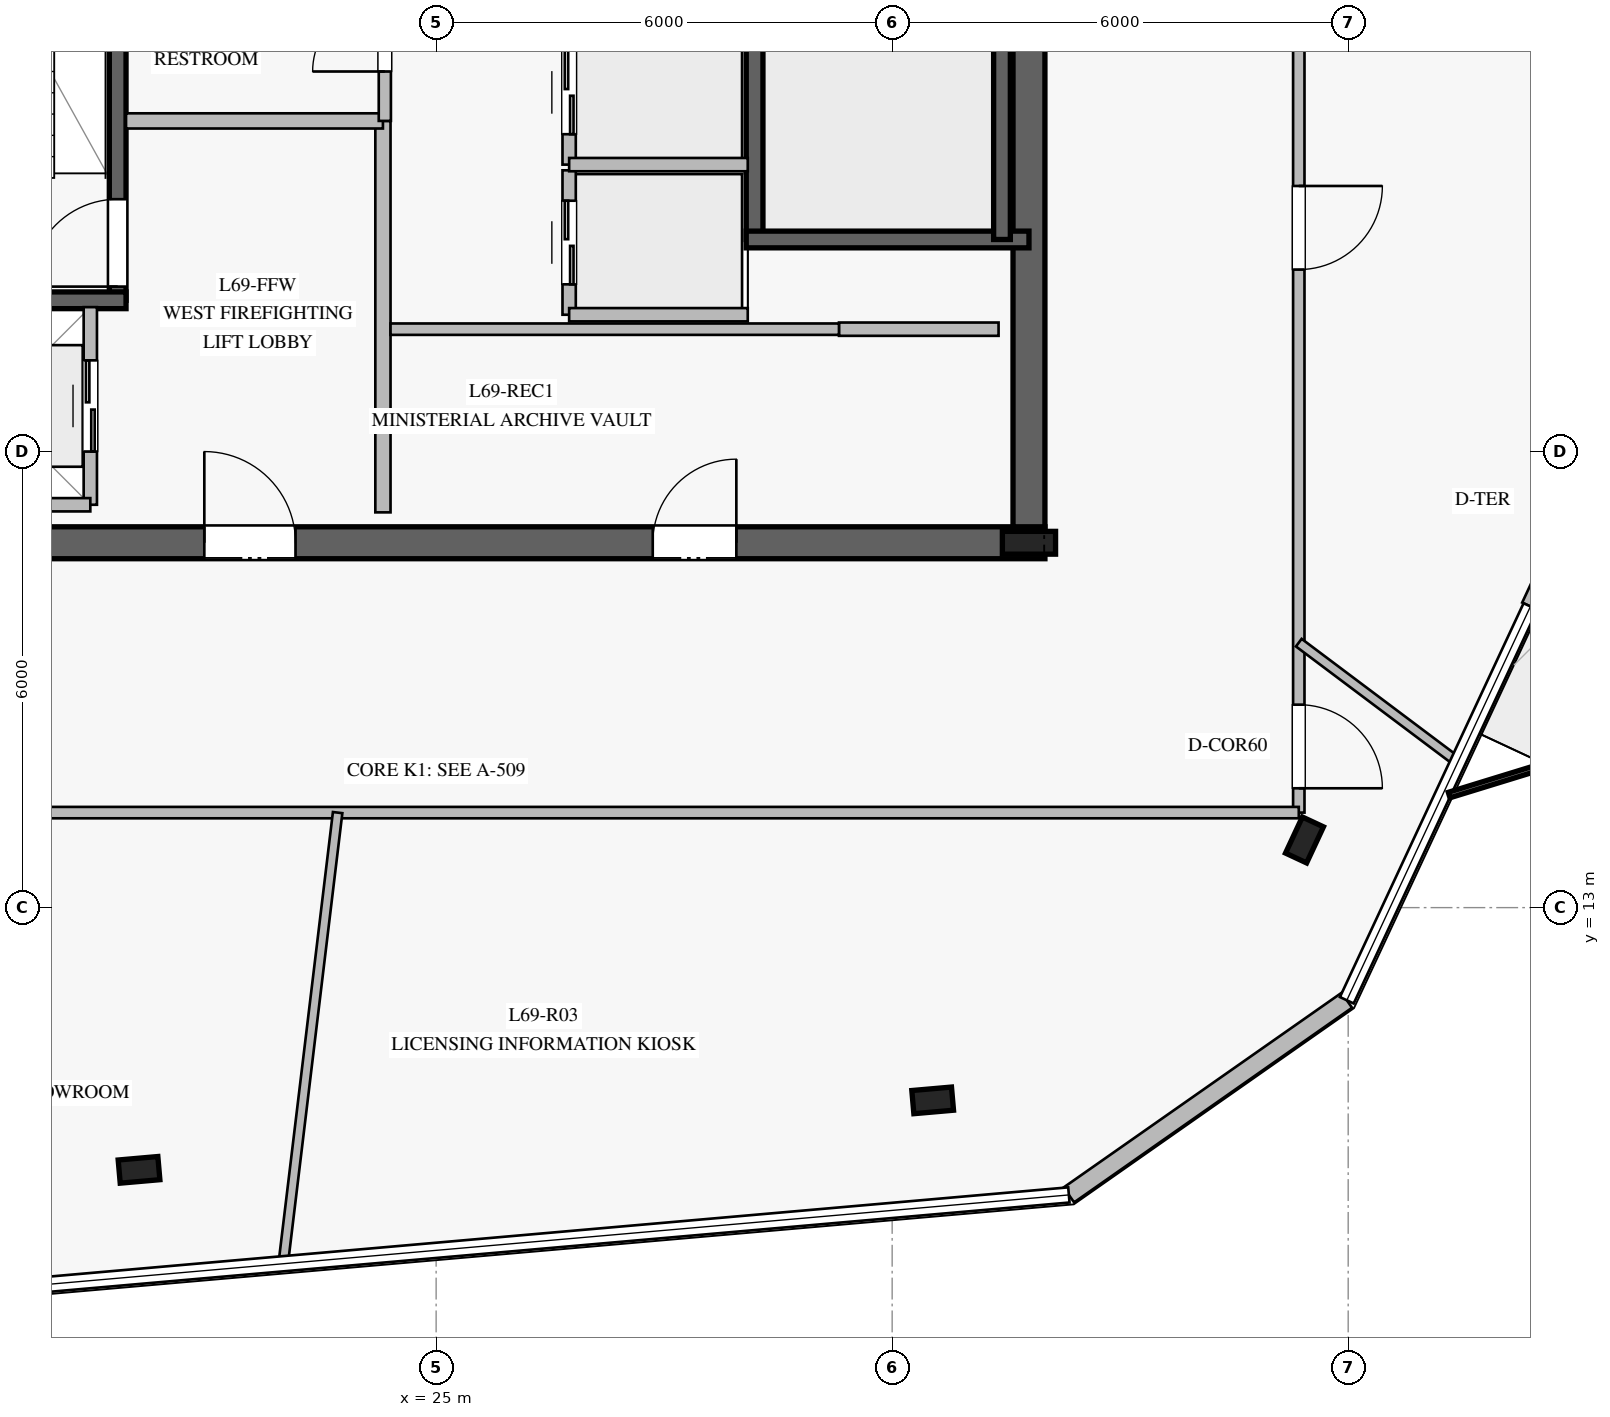
"""IFC4 building model, lengths in metres.
Left out: names, types, materials, properties, quantities, classifications, styles, units other than length and angle.
Written with IfcOpenShell. Run it as: python <this file> out.ifc"""

import sys

from ifc_helpers import new_model, si_unit, direction, frame, frame_2d, origin, origin_2d, place, context, subcontext, project, spatial, rectangle, i_section, extrude, element, fill, save


model = new_model("IFC4")
c1 = context("Model", 3, precision=1e-05, world=origin(), true_north=direction((0.0, 1.0)))
c2 = subcontext(c1, "Body", "Model", "MODEL_VIEW")
j1 = project(units=[si_unit("LENGTHUNIT", "METRE"), si_unit("PLANEANGLEUNIT", "RADIAN")], contexts=[c1])
p1 = place(None, origin())
s1 = spatial("IfcSite", under=j1, at=p1, CompositionType="ELEMENT")
p2 = place(p1, origin())
s2 = spatial("IfcBuilding", under=s1, at=p2, CompositionType="ELEMENT")
p3 = place(p2, frame((0.0, 0.0, 286.2)))
s3 = spatial("IfcBuildingStorey", under=s2, at=p3, CompositionType="ELEMENT", Elevation=286.2)
p4 = place(p3, frame((16.99, 17.8, 0.0), z_axis=(0.0, 0.0, 1.0), x_axis=(1.0, 0.0, 0.0)))
e1 = element("IfcWall", 1, at=p4, inside=s3, PredefinedType="SHEAR", context=c2, shape_type="SweptSolid", body=[
    extrude(rectangle(XDim=16.02, YDim=0.42, at=frame_2d((8.01, 0.0))), origin(), (0.0, 0.0, 1.0), 3.78),
])
p5 = place(p4, frame((4.96, 0.0, 0.0)))
e2 = element("IfcOpeningElement", 2, at=p5, cuts=e1, PredefinedType="OPENING", context=c2, shape_type="SweptSolid", body=[
    extrude(rectangle(XDim=1.2, YDim=2.25, at=frame_2d((0.6, 1.125))), frame((0.0, 0.22, 0.0), z_axis=(0.0, -1.0, 0.0), x_axis=(1.0, 0.0, 0.0)), (0.0, 0.0, 1.0), 0.44),
])
p6 = place(p4, frame((10.86, 0.0, 0.0)))
e3 = element("IfcOpeningElement", 3, at=p6, cuts=e1, PredefinedType="OPENING", context=c2, shape_type="SweptSolid", body=[
    extrude(rectangle(XDim=1.1, YDim=2.2, at=frame_2d((0.55, 1.1))), frame((0.0, 0.22, 0.0), z_axis=(0.0, -1.0, 0.0), x_axis=(1.0, 0.0, 0.0)), (0.0, 0.0, 1.0), 0.44),
])
p7 = place(p3, frame((32.8, 18.01, 0.0), z_axis=(0.0, 0.0, 1.0), x_axis=(0.0, 1.0, 0.0)))
e4 = element("IfcWall", 4, at=p7, inside=s3, PredefinedType="SHEAR", context=c2, shape_type="SweptSolid", body=[
    extrude(rectangle(XDim=13.98, YDim=0.42, at=frame_2d((6.99, 0.0))), origin(), (0.0, 0.0, 1.0), 3.78),
])
p8 = place(p3, frame((32.8, 17.8, 0.0), z_axis=(0.0, 0.0, 1.0), x_axis=(1.0, 0.0, 0.0)))
e5 = element("IfcColumn", 5, at=p8, inside=s3, PredefinedType="COLUMN", context=c2, shape_type="SweptSolid", body=[
    extrude(i_section(OverallWidth=0.3, OverallDepth=0.7, WebThickness=0.017, FlangeThickness=0.032, at=origin_2d()), origin(), (0.0, 0.0, 1.0), 4.0),
])
p9 = place(p3, frame((20.81, 20.99, 0.0), z_axis=(0.0, 0.0, 1.0), x_axis=(0.0, 1.0, 0.0)))
e6 = element("IfcWall", 6, at=p9, inside=s3, PredefinedType="SOLIDWALL", context=c2, shape_type="SweptSolid", body=[
    extrude(rectangle(XDim=7.22, YDim=0.22, at=frame_2d((3.61, 0.0))), origin(), (0.0, 0.0, 1.0), 3.78),
])
p10 = place(p9, frame((0.18, 0.0, 0.0)))
e7 = element("IfcOpeningElement", 7, at=p10, cuts=e6, PredefinedType="OPENING", context=c2, shape_type="SweptSolid", body=[
    extrude(rectangle(XDim=1.15, YDim=2.2, at=frame_2d((0.575, 1.1))), frame((0.0, 0.12, 0.0), z_axis=(0.0, -1.0, 0.0), x_axis=(1.0, 0.0, 0.0)), (0.0, 0.0, 1.0), 0.24),
])
p11 = place(p3, frame((17.2, 20.99, 0.0), z_axis=(0.0, 0.0, 1.0), x_axis=(1.0, 0.0, 0.0)))
e8 = element("IfcWall", 8, at=p11, inside=s3, PredefinedType="SOLIDWALL", context=c2, shape_type="SweptSolid", body=[
    extrude(rectangle(XDim=3.72, YDim=0.22, at=frame_2d((1.86, 0.0))), origin(), (0.0, 0.0, 1.0), 3.78),
])
p12 = place(p3, frame((29.19, 21.79, 0.0), z_axis=(0.0, 0.0, 1.0), x_axis=(0.0, 1.0, 0.0)))
e9 = element("IfcWall", 9, at=p12, inside=s3, PredefinedType="SOLIDWALL", context=c2, shape_type="SweptSolid", body=[
    extrude(rectangle(XDim=7.22, YDim=0.22, at=frame_2d((3.61, 0.0))), origin(), (0.0, 0.0, 1.0), 3.78),
])
p13 = place(p12, frame((5.88, 0.0, 0.0)))
e10 = element("IfcOpeningElement", 10, at=p13, cuts=e9, PredefinedType="OPENING", context=c2, shape_type="SweptSolid", body=[
    extrude(rectangle(XDim=1.15, YDim=2.2, at=frame_2d((0.575, 1.1))), frame((0.0, 0.12, 0.0), z_axis=(0.0, -1.0, 0.0), x_axis=(1.0, 0.0, 0.0)), (0.0, 0.0, 1.0), 0.24),
])
p14 = place(p3, frame((29.08, 21.79, 0.0), z_axis=(0.0, 0.0, 1.0), x_axis=(1.0, 0.0, 0.0)))
e11 = element("IfcWall", 11, at=p14, inside=s3, PredefinedType="SOLIDWALL", context=c2, shape_type="SweptSolid", body=[
    extrude(rectangle(XDim=3.72, YDim=0.22, at=frame_2d((1.86, 0.0))), origin(), (0.0, 0.0, 1.0), 3.78),
])
p15 = place(p3, frame((32.445, 29.01, 0.0), z_axis=(0.0, 0.0, 1.0), x_axis=(0.0, -1.0, 0.0)))
e12 = element("IfcWall", 12, at=p15, inside=s3, PredefinedType="SOLIDWALL", context=c2, shape_type="SweptSolid", body=[
    extrude(rectangle(XDim=7.22, YDim=0.22, at=frame_2d((3.61, 0.0))), origin(), (0.0, 0.0, 1.0), 3.78),
])
for number, where, z_axis, x_axis in (
    (13, (21.091, 9.55, 0.0), (0.0, 0.0, 1.0), (0.996, 0.087, 0.0)),
    (14, (31.533, 10.464, 0.0), (0.0, 0.0, 1.0), (0.996, 0.087, 0.0)),
    (15, (36.425, 13.89, 0.0), (0.0, 0.0, 1.0), (0.423, 0.906, 0.0)),
):
    element("IfcColumn", number, at=place(p3, frame(where, z_axis=z_axis, x_axis=x_axis)), inside=s3, PredefinedType="COLUMN", context=c2, shape_type="SweptSolid", body=[
        extrude(i_section(OverallWidth=0.306, OverallDepth=0.524, WebThickness=0.021, FlangeThickness=0.04, at=origin_2d()), origin(), (0.0, 0.0, 1.0), 4.0),
    ])
p16 = place(p3, frame((33.325, 9.22, 0.0), z_axis=(0.0, 0.0, 1.0), x_axis=(0.819111157222, 0.573634824705, 0.0)))
e16 = element("IfcWall", 16, at=p16, inside=s3, PredefinedType="STANDARD", context=c2, shape_type="SweptSolid", body=[
    extrude(rectangle(XDim=4.465, YDim=0.24, at=frame_2d((2.232, 0.0))), origin(), (0.0, 0.0, 1.0), 3.78),
])
p17 = place(p3, frame((39.398, 16.962, 0.0), z_axis=(0.0, 0.0, 1.0), x_axis=(0.422590274694, 0.906320837085, 0.0)))
e17 = element("IfcWall", 17, at=p17, inside=s3, PredefinedType="STANDARD", context=c2, shape_type="SweptSolid", body=[
    extrude(rectangle(XDim=2.4, YDim=0.24, at=frame_2d((1.2, 0.0))), origin(), (0.0, 0.0, 1.0), 3.78),
])
p18 = place(p17, frame((0.4, 0.0, 0.0)))
e18 = element("IfcOpeningElement", 18, at=p18, cuts=e17, PredefinedType="OPENING", context=c2, shape_type="SweptSolid", body=[
    extrude(rectangle(XDim=1.6, YDim=2.25, at=frame_2d((0.8, 1.125))), frame((0.0, 0.13, 0.0), z_axis=(0.0, -1.0, 0.0), x_axis=(1.0, 0.0, 0.0)), (0.0, 0.0, 1.0), 0.26),
])
p19 = place(p3, frame((24.3, 18.2, 0.0), z_axis=(0.0, 0.0, 1.0), x_axis=(0.0, 1.0, 0.0)))
e19 = element("IfcWall", 19, at=p19, inside=s3, PredefinedType="PARTITIONING", context=c2, shape_type="SweptSolid", body=[
    extrude(rectangle(XDim=5.15, YDim=0.2, at=frame_2d((2.575, 0.0))), origin(), (0.0, 0.0, 1.0), 3.78),
])
p20 = place(p3, frame((20.92, 23.35, 0.0), z_axis=(0.0, 0.0, 1.0), x_axis=(1.0, 0.0, 0.0)))
e20 = element("IfcWall", 20, at=p20, inside=s3, PredefinedType="PARTITIONING", context=c2, shape_type="SweptSolid", body=[
    extrude(rectangle(XDim=3.38, YDim=0.2, at=frame_2d((1.69, 0.0))), origin(), (0.0, 0.0, 1.0), 3.78),
])
p21 = place(p3, frame((24.325, 23.35, 0.0), z_axis=(0.0, 0.0, 1.0), x_axis=(0.0, 1.0, 0.0)))
e21 = element("IfcWall", 21, at=p21, inside=s3, PredefinedType="PLUMBINGWALL", context=c2, shape_type="SweptSolid", body=[
    extrude(rectangle(XDim=4.93, YDim=0.16, at=frame_2d((2.465, 0.0))), origin(), (0.0, 0.0, 1.0), 3.78),
])
p22 = place(p21, frame((0.65, 0.0, 0.0)))
e22 = element("IfcOpeningElement", 22, at=p22, cuts=e21, PredefinedType="OPENING", context=c2, shape_type="SweptSolid", body=[
    extrude(rectangle(XDim=0.95, YDim=2.1, at=frame_2d((0.475, 1.05))), frame((0.0, 0.09, 0.0), z_axis=(0.0, -1.0, 0.0), x_axis=(1.0, 0.0, 0.0)), (0.0, 0.0, 1.0), 0.18),
])
p23 = place(p21, frame((3.11, 0.0, 0.0)))
e23 = element("IfcOpeningElement", 23, at=p23, cuts=e21, PredefinedType="OPENING", context=c2, shape_type="SweptSolid", body=[
    extrude(rectangle(XDim=0.9, YDim=2.1, at=frame_2d((0.45, 1.05))), frame((0.0, 0.09, 0.0), z_axis=(0.0, -1.0, 0.0), x_axis=(1.0, 0.0, 0.0)), (0.0, 0.0, 1.0), 0.18),
])
p24 = place(p3, frame((30.3, 20.61, 0.0), z_axis=(0.0, 0.0, 1.0), x_axis=(1.0, 0.0, 0.0)))
e24 = element("IfcWall", 24, at=p24, inside=s3, PredefinedType="PARTITIONING", context=c2, shape_type="SweptSolid", body=[
    extrude(rectangle(XDim=2.1, YDim=0.175, at=frame_2d((1.05, 0.0))), origin(), (0.0, 0.0, 1.0), 3.78),
])
p25 = place(p3, frame((24.4, 20.61, 0.0), z_axis=(0.0, 0.0, 1.0), x_axis=(1.0, 0.0, 0.0)))
e25 = element("IfcWall", 25, at=p25, inside=s3, PredefinedType="PARTITIONING", context=c2, shape_type="SweptSolid", body=[
    extrude(rectangle(XDim=5.9, YDim=0.15, at=frame_2d((2.95, 0.0))), origin(), (0.0, 0.0, 1.0), 3.78),
])
p26 = place(p3, frame((26.75, 20.8, 0.0), z_axis=(0.0, 0.0, 1.0), x_axis=(0.0, 1.0, 0.0)))
e26 = element("IfcWall", 26, at=p26, inside=s3, PredefinedType="PARTITIONING", context=c2, shape_type="SweptSolid", body=[
    extrude(rectangle(XDim=1.9, YDim=0.175, at=frame_2d((0.95, 0.0))), origin(), (0.0, 0.0, 1.0), 3.78),
])
p27 = place(p26, frame((0.4, 0.0, 0.0)))
e27 = element("IfcOpeningElement", 27, at=p27, cuts=e26, PredefinedType="OPENING", context=c2, shape_type="SweptSolid", body=[
    extrude(rectangle(XDim=1.1, YDim=2.2, at=frame_2d((0.55, 1.1))), frame((0.0, 0.098, 0.0), z_axis=(0.0, -1.0, 0.0), x_axis=(1.0, 0.0, 0.0)), (0.0, 0.0, 1.0), 0.195),
])
p28 = place(p3, frame((26.75, 20.8, 0.0), z_axis=(0.0, 0.0, 1.0), x_axis=(1.0, 0.0, 0.0)))
e28 = element("IfcWall", 28, at=p28, inside=s3, PredefinedType="PARTITIONING", context=c2, shape_type="SweptSolid", body=[
    extrude(rectangle(XDim=2.35, YDim=0.175, at=frame_2d((1.175, 0.0))), origin(), (0.0, 0.0, 1.0), 3.78),
])
p29 = place(p3, frame((26.75, 22.775, 0.0), z_axis=(0.0, 0.0, 1.0), x_axis=(0.0, 1.0, 0.0)))
e29 = element("IfcWall", 29, at=p29, inside=s3, PredefinedType="PARTITIONING", context=c2, shape_type="SweptSolid", body=[
    extrude(rectangle(XDim=1.9, YDim=0.175, at=frame_2d((0.95, 0.0))), origin(), (0.0, 0.0, 1.0), 3.78),
])
p30 = place(p29, frame((0.4, 0.0, 0.0)))
e30 = element("IfcOpeningElement", 30, at=p30, cuts=e29, PredefinedType="OPENING", context=c2, shape_type="SweptSolid", body=[
    extrude(rectangle(XDim=1.1, YDim=2.2, at=frame_2d((0.55, 1.1))), frame((0.0, 0.098, 0.0), z_axis=(0.0, -1.0, 0.0), x_axis=(1.0, 0.0, 0.0)), (0.0, 0.0, 1.0), 0.195),
])
p31 = place(p3, frame((26.75, 22.775, 0.0), z_axis=(0.0, 0.0, 1.0), x_axis=(1.0, 0.0, 0.0)))
e31 = element("IfcWall", 31, at=p31, inside=s3, PredefinedType="PARTITIONING", context=c2, shape_type="SweptSolid", body=[
    extrude(rectangle(XDim=2.35, YDim=0.175, at=frame_2d((1.175, 0.0))), origin(), (0.0, 0.0, 1.0), 3.78),
])
p32 = place(p3, frame((20.45, 18.3, 0.0), z_axis=(0.0, 0.0, 1.0), x_axis=(0.0, 1.0, 0.0)))
e32 = element("IfcWall", 32, at=p32, inside=s3, PredefinedType="PARTITIONING", context=c2, shape_type="SweptSolid", body=[
    extrude(rectangle(XDim=2.6, YDim=0.175, at=frame_2d((1.3, 0.0))), origin(), (0.0, 0.0, 1.0), 3.78),
])
p33 = place(p32, frame((0.7, 0.0, 0.0)))
e33 = element("IfcOpeningElement", 33, at=p33, cuts=e32, PredefinedType="OPENING", context=c2, shape_type="SweptSolid", body=[
    extrude(rectangle(XDim=1.2, YDim=2.2, at=frame_2d((0.6, 1.1))), frame((0.0, 0.098, 0.0), z_axis=(0.0, -1.0, 0.0), x_axis=(1.0, 0.0, 0.0)), (0.0, 0.0, 1.0), 0.195),
])
p34 = place(p3, frame((17.85, 18.3, 0.0), z_axis=(0.0, 0.0, 1.0), x_axis=(1.0, 0.0, 0.0)))
e34 = element("IfcWall", 34, at=p34, inside=s3, PredefinedType="PARTITIONING", context=c2, shape_type="SweptSolid", body=[
    extrude(rectangle(XDim=2.6, YDim=0.175, at=frame_2d((1.3, 0.0))), origin(), (0.0, 0.0, 1.0), 3.78),
])
p35 = place(p3, frame((36.35, 35.75, 0.0), z_axis=(0.0, 0.0, 1.0), x_axis=(0.0, -1.0, 0.0)))
e35 = element("IfcWall", 35, at=p35, inside=s3, PredefinedType="PARTITIONING", context=c2, shape_type="SweptSolid", body=[
    extrude(rectangle(XDim=21.5, YDim=0.15, at=frame_2d((10.75, 0.0))), origin(), (0.0, 0.0, 1.0), 3.02),
])
p36 = place(p35, frame((20.08, 0.0, 0.0)))
e36 = element("IfcOpeningElement", 36, at=p36, cuts=e35, PredefinedType="OPENING", context=c2, shape_type="SweptSolid", body=[
    extrude(rectangle(XDim=1.1, YDim=2.2, at=frame_2d((0.55, 1.1))), frame((0.0, 0.085, 0.0), z_axis=(0.0, -1.0, 0.0), x_axis=(1.0, 0.0, 0.0)), (0.0, 0.0, 1.0), 0.17),
])
p37 = place(p35, frame((13.256, 0.0, 0.0)))
e37 = element("IfcOpeningElement", 37, at=p37, cuts=e35, PredefinedType="OPENING", context=c2, shape_type="SweptSolid", body=[
    extrude(rectangle(XDim=1.1, YDim=2.2, at=frame_2d((0.55, 1.1))), frame((0.0, 0.085, 0.0), z_axis=(0.0, -1.0, 0.0), x_axis=(1.0, 0.0, 0.0)), (0.0, 0.0, 1.0), 0.17),
])
p38 = place(p3, frame((36.35, 14.25, 0.0), z_axis=(0.0, 0.0, 1.0), x_axis=(-1.0, 0.0, 0.0)))
e38 = element("IfcWall", 38, at=p38, inside=s3, PredefinedType="PARTITIONING", context=c2, shape_type="SweptSolid", body=[
    extrude(rectangle(XDim=22.7, YDim=0.15, at=frame_2d((11.35, 0.0))), origin(), (0.0, 0.0, 1.0), 3.05),
])
p39 = place(p38, frame((16.944, 0.0, 0.0)))
e39 = element("IfcOpeningElement", 39, at=p39, cuts=e38, PredefinedType="OPENING", context=c2, shape_type="SweptSolid", body=[
    extrude(rectangle(XDim=1.1, YDim=2.2, at=frame_2d((0.55, 1.1))), frame((0.0, 0.085, 0.0), z_axis=(0.0, -1.0, 0.0), x_axis=(1.0, 0.0, 0.0)), (0.0, 0.0, 1.0), 0.17),
])
p40 = place(p3, frame((23.704, 14.25, 0.0), z_axis=(0.0, 0.0, 1.0), x_axis=(-0.119779797653, -0.992800483518, 0.0)))
e40 = element("IfcWall", 40, at=p40, inside=s3, PredefinedType="PARTITIONING", context=c2, shape_type="SweptSolid", body=[
    extrude(rectangle(XDim=5.962, YDim=0.125, at=frame_2d((2.981, 0.0))), origin(), (0.0, 0.0, 1.0), 3.05),
])
p41 = place(p3, frame((36.35, 16.486, 0.0), z_axis=(0.0, 0.0, 1.0), x_axis=(0.799785896755, -0.600285364932, 0.0)))
e41 = element("IfcWall", 41, at=p41, inside=s3, PredefinedType="PARTITIONING", context=c2, shape_type="SweptSolid", body=[
    extrude(rectangle(XDim=2.601, YDim=0.125, at=frame_2d((1.3, 0.0))), origin(), (0.0, 0.0, 1.0), 3.28),
])
p42 = place(p10, origin())
e42 = element("IfcDoor", 42, at=p42, inside=s3, OperationType="SINGLE_SWING_LEFT", PredefinedType="DOOR", context=c2, shape_type="SweptSolid", body=[
    extrude(rectangle(XDim=1.15, YDim=2.2, at=frame_2d((0.575, 1.1))), frame((0.0, 0.025, 0.0), z_axis=(0.0, -1.0, 0.0), x_axis=(1.0, 0.0, 0.0)), (0.0, 0.0, 1.0), 0.05),
])
fill(e7, e42)
p43 = place(p5, origin())
e43 = element("IfcDoor", 43, at=p43, inside=s3, OperationType="SINGLE_SWING_LEFT", PredefinedType="DOOR", context=c2, shape_type="SweptSolid", body=[
    extrude(rectangle(XDim=1.2, YDim=2.25, at=frame_2d((0.6, 1.125))), frame((0.0, 0.025, 0.0), z_axis=(0.0, -1.0, 0.0), x_axis=(1.0, 0.0, 0.0)), (0.0, 0.0, 1.0), 0.05),
])
fill(e2, e43)
p44 = place(p22, origin())
e44 = element("IfcDoor", 44, at=p44, inside=s3, OperationType="SINGLE_SWING_LEFT", PredefinedType="DOOR", context=c2, shape_type="SweptSolid", body=[
    extrude(rectangle(XDim=0.95, YDim=2.1, at=frame_2d((0.475, 1.05))), frame((0.0, 0.025, 0.0), z_axis=(0.0, -1.0, 0.0), x_axis=(1.0, 0.0, 0.0)), (0.0, 0.0, 1.0), 0.05),
])
fill(e22, e44)
p45 = place(p6, origin())
e45 = element("IfcDoor", 45, at=p45, inside=s3, OperationType="SINGLE_SWING_RIGHT", PredefinedType="DOOR", context=c2, shape_type="SweptSolid", body=[
    extrude(rectangle(XDim=1.1, YDim=2.2, at=frame_2d((0.55, 1.1))), frame((0.0, 0.025, 0.0), z_axis=(0.0, -1.0, 0.0), x_axis=(1.0, 0.0, 0.0)), (0.0, 0.0, 1.0), 0.05),
])
fill(e3, e45)
p46 = place(p27, origin())
e46 = element("IfcDoor", 46, at=p46, inside=s3, OperationType="DOUBLE_DOOR_SLIDING", PredefinedType="DOOR", context=c2, shape_type="SweptSolid", body=[
    extrude(rectangle(XDim=1.1, YDim=2.2, at=frame_2d((0.55, 1.1))), frame((0.0, 0.025, 0.0), z_axis=(0.0, -1.0, 0.0), x_axis=(1.0, 0.0, 0.0)), (0.0, 0.0, 1.0), 0.05),
])
fill(e27, e46)
p47 = place(p30, origin())
e47 = element("IfcDoor", 47, at=p47, inside=s3, OperationType="DOUBLE_DOOR_SLIDING", PredefinedType="DOOR", context=c2, shape_type="SweptSolid", body=[
    extrude(rectangle(XDim=1.1, YDim=2.2, at=frame_2d((0.55, 1.1))), frame((0.0, 0.025, 0.0), z_axis=(0.0, -1.0, 0.0), x_axis=(1.0, 0.0, 0.0)), (0.0, 0.0, 1.0), 0.05),
])
fill(e30, e47)
p48 = place(p33, origin())
e48 = element("IfcDoor", 48, at=p48, inside=s3, OperationType="DOUBLE_DOOR_SLIDING", PredefinedType="DOOR", context=c2, shape_type="SweptSolid", body=[
    extrude(rectangle(XDim=1.2, YDim=2.2, at=frame_2d((0.6, 1.1))), frame((0.0, 0.025, 0.0), z_axis=(0.0, -1.0, 0.0), x_axis=(1.0, 0.0, 0.0)), (0.0, 0.0, 1.0), 0.05),
])
fill(e33, e48)
p49 = place(p36, origin())
e49 = element("IfcDoor", 49, at=p49, inside=s3, OperationType="SINGLE_SWING_RIGHT", PredefinedType="DOOR", context=c2, shape_type="SweptSolid", body=[
    extrude(rectangle(XDim=1.1, YDim=2.2, at=frame_2d((0.55, 1.1))), frame((0.0, 0.025, 0.0), z_axis=(0.0, -1.0, 0.0), x_axis=(1.0, 0.0, 0.0)), (0.0, 0.0, 1.0), 0.05),
])
fill(e36, e49)
p50 = place(p37, origin())
e50 = element("IfcDoor", 50, at=p50, inside=s3, OperationType="SINGLE_SWING_LEFT", PredefinedType="DOOR", context=c2, shape_type="SweptSolid", body=[
    extrude(rectangle(XDim=1.1, YDim=2.2, at=frame_2d((0.55, 1.1))), frame((0.0, 0.025, 0.0), z_axis=(0.0, -1.0, 0.0), x_axis=(1.0, 0.0, 0.0)), (0.0, 0.0, 1.0), 0.05),
])
fill(e37, e50)
save(model, sys.argv[1])
